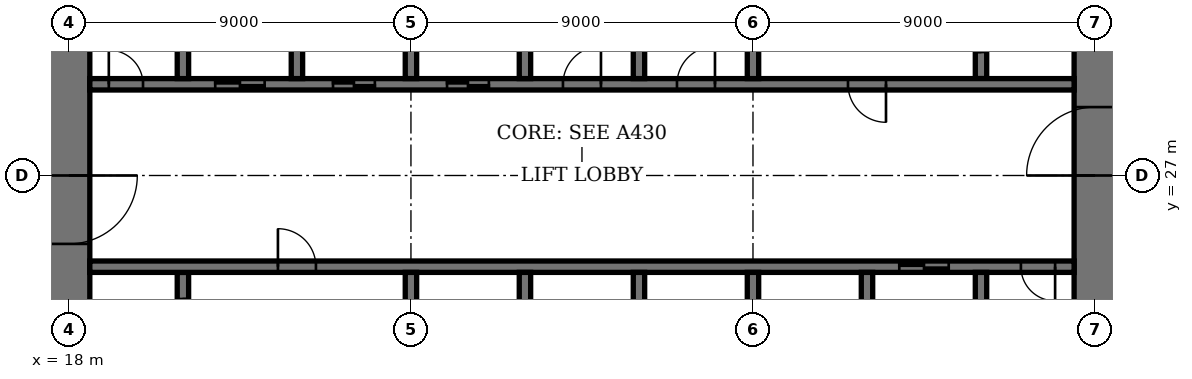
"""IFC4 building model, lengths in metres.
Left out: names, types, materials, properties, quantities, classifications, styles, units other than length and angle.
Written with IfcOpenShell. Run it as: python <this file> out.ifc"""

import sys

from ifc_helpers import new_model, si_unit, direction, frame, frame_2d, origin, place, context, subcontext, project, spatial, rectangle, extrude, element, fill, save


model = new_model("IFC4")
c1 = context("Model", 3, precision=1e-05, world=origin(), true_north=direction((0.0, 1.0)))
c2 = subcontext(c1, "Body", "Model", "MODEL_VIEW")
j1 = project(units=[si_unit("LENGTHUNIT", "METRE"), si_unit("PLANEANGLEUNIT", "RADIAN")], contexts=[c1])
p1 = place(None, origin())
s1 = spatial("IfcSite", under=j1, at=p1, CompositionType="ELEMENT")
p2 = place(p1, origin())
s2 = spatial("IfcBuilding", under=s1, at=p2, CompositionType="ELEMENT")
p3 = place(p2, frame((0.0, 0.0, 166.2)))
s3 = spatial("IfcBuildingStorey", under=s2, at=p3, CompositionType="ELEMENT", Elevation=166.2)
p4 = place(p3, frame((18.0, 35.45, 0.0), z_axis=(0.0, 0.0, 1.0), x_axis=(0.0, -1.0, 0.0)))
e1 = element("IfcWall", 1, at=p4, inside=s3, PredefinedType="SHEAR", context=c2, shape_type="SweptSolid", body=[
    extrude(rectangle(XDim=16.9, YDim=1.1, at=frame_2d((8.45, 0.0))), origin(), (0.0, 0.0, 1.0), 4.0),
])
p5 = place(p4, frame((8.45, 0.0, 0.0)))
e2 = element("IfcOpeningElement", 2, at=p5, cuts=e1, PredefinedType="OPENING", context=c2, shape_type="SweptSolid", body=[
    extrude(rectangle(XDim=1.8, YDim=2.4, at=frame_2d((0.9, 1.2))), frame((0.0, 0.56, 0.0), z_axis=(0.0, -1.0, 0.0), x_axis=(1.0, 0.0, 0.0)), (0.0, 0.0, 1.0), 1.12),
])
p6 = place(p3, frame((45.0, 18.55, 0.0), z_axis=(0.0, 0.0, 1.0), x_axis=(0.0, 1.0, 0.0)))
e3 = element("IfcWall", 3, at=p6, inside=s3, PredefinedType="SHEAR", context=c2, shape_type="SweptSolid", body=[
    extrude(rectangle(XDim=16.9, YDim=1.1, at=frame_2d((8.45, 0.0))), origin(), (0.0, 0.0, 1.0), 4.0),
])
p7 = place(p6, frame((8.45, 0.0, 0.0)))
e4 = element("IfcOpeningElement", 4, at=p7, cuts=e3, PredefinedType="OPENING", context=c2, shape_type="SweptSolid", body=[
    extrude(rectangle(XDim=1.8, YDim=2.4, at=frame_2d((0.9, 1.2))), frame((0.0, 0.56, 0.0), z_axis=(0.0, -1.0, 0.0), x_axis=(1.0, 0.0, 0.0)), (0.0, 0.0, 1.0), 1.12),
])
p8 = place(p3, frame((21.0, 21.95, 0.0), z_axis=(0.0, 0.0, 1.0), x_axis=(0.0, 1.0, 0.0)))
e5 = element("IfcWall", 5, at=p8, inside=s3, PredefinedType="SHEAR", context=c2, shape_type="SweptSolid", body=[
    extrude(rectangle(XDim=2.5, YDim=0.3, at=frame_2d((1.25, 0.0))), origin(), (0.0, 0.0, 1.0), 4.0),
])
p9 = place(p8, frame((0.7, 0.0, 0.0)))
e6 = element("IfcOpeningElement", 6, at=p9, cuts=e5, PredefinedType="OPENING", context=c2, shape_type="SweptSolid", body=[
    extrude(rectangle(XDim=1.1, YDim=2.4, at=frame_2d((0.55, 1.2))), frame((0.0, 0.16, 0.0), z_axis=(0.0, -1.0, 0.0), x_axis=(1.0, 0.0, 0.0)), (0.0, 0.0, 1.0), 0.32),
])
p10 = place(p3, frame((42.0, 29.55, 0.0), z_axis=(0.0, 0.0, 1.0), x_axis=(0.0, 1.0, 0.0)))
e7 = element("IfcWall", 7, at=p10, inside=s3, PredefinedType="SHEAR", context=c2, shape_type="SweptSolid", body=[
    extrude(rectangle(XDim=2.5, YDim=0.3, at=frame_2d((1.25, 0.0))), origin(), (0.0, 0.0, 1.0), 4.0),
])
p11 = place(p10, frame((0.7, 0.0, 0.0)))
e8 = element("IfcOpeningElement", 8, at=p11, cuts=e7, PredefinedType="OPENING", context=c2, shape_type="SweptSolid", body=[
    extrude(rectangle(XDim=1.1, YDim=2.4, at=frame_2d((0.55, 1.2))), frame((0.0, 0.16, 0.0), z_axis=(0.0, -1.0, 0.0), x_axis=(1.0, 0.0, 0.0)), (0.0, 0.0, 1.0), 0.32),
])
p12 = place(p3, frame((18.55, 24.6, 0.0), z_axis=(0.0, 0.0, 1.0), x_axis=(1.0, 0.0, 0.0)))
e9 = element("IfcWall", 9, at=p12, inside=s3, PredefinedType="SHEAR", context=c2, shape_type="SweptSolid", body=[
    extrude(rectangle(XDim=25.9, YDim=0.3, at=frame_2d((12.95, 0.0))), origin(), (0.0, 0.0, 1.0), 4.0),
])
p13 = place(p12, frame((4.95, 0.0, 0.0)))
e10 = element("IfcOpeningElement", 10, at=p13, cuts=e9, PredefinedType="OPENING", context=c2, shape_type="SweptSolid", body=[
    extrude(rectangle(XDim=1.0, YDim=2.4, at=frame_2d((0.5, 1.2))), frame((0.0, 0.16, 0.0), z_axis=(0.0, -1.0, 0.0), x_axis=(1.0, 0.0, 0.0)), (0.0, 0.0, 1.0), 0.32),
])
p14 = place(p12, frame((24.5, 0.0, 0.0)))
e11 = element("IfcOpeningElement", 11, at=p14, cuts=e9, PredefinedType="OPENING", context=c2, shape_type="SweptSolid", body=[
    extrude(rectangle(XDim=0.9, YDim=2.1, at=frame_2d((0.45, 1.05))), frame((0.0, 0.16, 0.0), z_axis=(0.0, -1.0, 0.0), x_axis=(1.0, 0.0, 0.0)), (0.0, 0.0, 1.0), 0.32),
])
p15 = place(p12, frame((21.3, 0.0, 0.0)))
e12 = element("IfcOpeningElement", 12, at=p15, cuts=e9, PredefinedType="OPENING", context=c2, shape_type="SweptSolid", body=[
    extrude(rectangle(XDim=1.3, YDim=2.4, at=frame_2d((0.65, 1.2))), frame((0.0, 0.16, 0.0), z_axis=(0.0, -1.0, 0.0), x_axis=(1.0, 0.0, 0.0)), (0.0, 0.0, 1.0), 0.32),
])
p16 = place(p3, frame((18.55, 29.4, 0.0), z_axis=(0.0, 0.0, 1.0), x_axis=(1.0, 0.0, 0.0)))
e13 = element("IfcWall", 13, at=p16, inside=s3, PredefinedType="SHEAR", context=c2, shape_type="SweptSolid", body=[
    extrude(rectangle(XDim=25.9, YDim=0.3, at=frame_2d((12.95, 0.0))), origin(), (0.0, 0.0, 1.0), 4.0),
])
p17 = place(p16, frame((19.95, 0.0, 0.0)))
e14 = element("IfcOpeningElement", 14, at=p17, cuts=e13, PredefinedType="OPENING", context=c2, shape_type="SweptSolid", body=[
    extrude(rectangle(XDim=1.0, YDim=2.4, at=frame_2d((0.5, 1.2))), frame((0.0, 0.16, 0.0), z_axis=(0.0, -1.0, 0.0), x_axis=(1.0, 0.0, 0.0)), (0.0, 0.0, 1.0), 0.32),
])
p18 = place(p16, frame((0.5, 0.0, 0.0)))
e15 = element("IfcOpeningElement", 15, at=p18, cuts=e13, PredefinedType="OPENING", context=c2, shape_type="SweptSolid", body=[
    extrude(rectangle(XDim=0.9, YDim=2.1, at=frame_2d((0.45, 1.05))), frame((0.0, 0.16, 0.0), z_axis=(0.0, -1.0, 0.0), x_axis=(1.0, 0.0, 0.0)), (0.0, 0.0, 1.0), 0.32),
])
p19 = place(p16, frame((15.45, 0.0, 0.0)))
e16 = element("IfcOpeningElement", 16, at=p19, cuts=e13, PredefinedType="OPENING", context=c2, shape_type="SweptSolid", body=[
    extrude(rectangle(XDim=1.0, YDim=2.4, at=frame_2d((0.5, 1.2))), frame((0.0, 0.16, 0.0), z_axis=(0.0, -1.0, 0.0), x_axis=(1.0, 0.0, 0.0)), (0.0, 0.0, 1.0), 0.32),
])
p20 = place(p16, frame((12.45, 0.0, 0.0)))
e17 = element("IfcOpeningElement", 17, at=p20, cuts=e13, PredefinedType="OPENING", context=c2, shape_type="SweptSolid", body=[
    extrude(rectangle(XDim=1.0, YDim=2.4, at=frame_2d((0.5, 1.2))), frame((0.0, 0.16, 0.0), z_axis=(0.0, -1.0, 0.0), x_axis=(1.0, 0.0, 0.0)), (0.0, 0.0, 1.0), 0.32),
])
p21 = place(p16, frame((9.4, 0.0, 0.0)))
e18 = element("IfcOpeningElement", 18, at=p21, cuts=e13, PredefinedType="OPENING", context=c2, shape_type="SweptSolid", body=[
    extrude(rectangle(XDim=1.1, YDim=2.4, at=frame_2d((0.55, 1.2))), frame((0.0, 0.16, 0.0), z_axis=(0.0, -1.0, 0.0), x_axis=(1.0, 0.0, 0.0)), (0.0, 0.0, 1.0), 0.32),
])
p22 = place(p16, frame((6.4, 0.0, 0.0)))
e19 = element("IfcOpeningElement", 19, at=p22, cuts=e13, PredefinedType="OPENING", context=c2, shape_type="SweptSolid", body=[
    extrude(rectangle(XDim=1.1, YDim=2.4, at=frame_2d((0.55, 1.2))), frame((0.0, 0.16, 0.0), z_axis=(0.0, -1.0, 0.0), x_axis=(1.0, 0.0, 0.0)), (0.0, 0.0, 1.0), 0.32),
])
p23 = place(p16, frame((3.3, 0.0, 0.0)))
e20 = element("IfcOpeningElement", 20, at=p23, cuts=e13, PredefinedType="OPENING", context=c2, shape_type="SweptSolid", body=[
    extrude(rectangle(XDim=1.3, YDim=2.4, at=frame_2d((0.65, 1.2))), frame((0.0, 0.16, 0.0), z_axis=(0.0, -1.0, 0.0), x_axis=(1.0, 0.0, 0.0)), (0.0, 0.0, 1.0), 0.32),
])
for number, where, z_axis, x_axis in (
    (21, (30.0, 21.75, 0.0), (0.0, 0.0, 1.0), (0.0, 1.0, 0.0)),
    (22, (33.0, 29.55, 0.0), (0.0, 0.0, 1.0), (0.0, 1.0, 0.0)),
    (23, (33.0, 21.75, 0.0), (0.0, 0.0, 1.0), (0.0, 1.0, 0.0)),
    (24, (30.0, 29.55, 0.0), (0.0, 0.0, 1.0), (0.0, 1.0, 0.0)),
    (25, (36.0, 21.75, 0.0), (0.0, 0.0, 1.0), (0.0, 1.0, 0.0)),
    (26, (27.0, 29.55, 0.0), (0.0, 0.0, 1.0), (0.0, 1.0, 0.0)),
):
    element("IfcWall", number, at=place(p3, frame(where, z_axis=z_axis, x_axis=x_axis)), inside=s3, PredefinedType="SHEAR", context=c2, shape_type="SweptSolid", body=[
        extrude(rectangle(XDim=2.7, YDim=0.3, at=frame_2d((1.35, 0.0))), origin(), (0.0, 0.0, 1.0), 4.0),
    ])
for number, where, z_axis, x_axis in (
    (27, (39.0, 18.55, 0.0), (0.0, 0.0, 1.0), (0.0, 1.0, 0.0)),
    (28, (24.0, 29.55, 0.0), (0.0, 0.0, 1.0), (0.0, 1.0, 0.0)),
):
    element("IfcWall", number, at=place(p3, frame(where, z_axis=z_axis, x_axis=x_axis)), inside=s3, PredefinedType="SHEAR", context=c2, shape_type="SweptSolid", body=[
        extrude(rectangle(XDim=5.9, YDim=0.3, at=frame_2d((2.95, 0.0))), origin(), (0.0, 0.0, 1.0), 4.0),
    ])
for number, where, z_axis, x_axis in (
    (29, (42.0, 21.75, 0.0), (0.0, 0.0, 1.0), (0.0, 1.0, 0.0)),
    (30, (21.0, 29.55, 0.0), (0.0, 0.0, 1.0), (0.0, 1.0, 0.0)),
):
    element("IfcWall", number, at=place(p3, frame(where, z_axis=z_axis, x_axis=x_axis)), inside=s3, PredefinedType="SHEAR", context=c2, shape_type="SweptSolid", body=[
        extrude(rectangle(XDim=2.7, YDim=0.3, at=frame_2d((1.35, 0.0))), origin(), (0.0, 0.0, 1.0), 4.0),
    ])
for number, where, z_axis, x_axis in (
    (31, (27.0, 21.6, 0.0), (0.0, 0.0, 1.0), (0.0, 1.0, 0.0)),
    (32, (36.0, 29.55, 0.0), (0.0, 0.0, 1.0), (0.0, 1.0, 0.0)),
):
    element("IfcWall", number, at=place(p3, frame(where, z_axis=z_axis, x_axis=x_axis)), inside=s3, PredefinedType="SHEAR", context=c2, shape_type="SweptSolid", body=[
        extrude(rectangle(XDim=2.85, YDim=0.3, at=frame_2d((1.425, 0.0))), origin(), (0.0, 0.0, 1.0), 4.0),
    ])
p24 = place(p5, origin())
e33 = element("IfcDoor", 33, at=p24, inside=s3, OperationType="DOUBLE_DOOR_DOUBLE_SWING", PredefinedType="DOOR", context=c2, shape_type="SweptSolid", body=[
    extrude(rectangle(XDim=1.8, YDim=2.4, at=frame_2d((0.9, 1.2))), frame((0.0, 0.03, 0.0), z_axis=(0.0, -1.0, 0.0), x_axis=(1.0, 0.0, 0.0)), (0.0, 0.0, 1.0), 0.06),
    extrude(rectangle(XDim=0.04, YDim=2.4, at=frame_2d((0.02, 1.2))), frame((0.0, 0.55, 0.0), z_axis=(0.0, -1.0, 0.0), x_axis=(1.0, 0.0, 0.0)), (0.0, 0.0, 1.0), 1.1),
    extrude(rectangle(XDim=0.04, YDim=2.4, at=frame_2d((1.78, 1.2))), frame((0.0, 0.55, 0.0), z_axis=(0.0, -1.0, 0.0), x_axis=(1.0, 0.0, 0.0)), (0.0, 0.0, 1.0), 1.1),
    extrude(rectangle(XDim=1.8, YDim=0.04, at=frame_2d((0.9, 2.38))), frame((0.0, 0.55, 0.0), z_axis=(0.0, -1.0, 0.0), x_axis=(1.0, 0.0, 0.0)), (0.0, 0.0, 1.0), 1.1),
])
fill(e2, e33)
p25 = place(p7, origin())
e34 = element("IfcDoor", 34, at=p25, inside=s3, OperationType="DOUBLE_DOOR_DOUBLE_SWING", PredefinedType="DOOR", context=c2, shape_type="SweptSolid", body=[
    extrude(rectangle(XDim=1.8, YDim=2.4, at=frame_2d((0.9, 1.2))), frame((0.0, 0.03, 0.0), z_axis=(0.0, -1.0, 0.0), x_axis=(1.0, 0.0, 0.0)), (0.0, 0.0, 1.0), 0.06),
    extrude(rectangle(XDim=0.04, YDim=2.4, at=frame_2d((0.02, 1.2))), frame((0.0, 0.55, 0.0), z_axis=(0.0, -1.0, 0.0), x_axis=(1.0, 0.0, 0.0)), (0.0, 0.0, 1.0), 1.1),
    extrude(rectangle(XDim=0.04, YDim=2.4, at=frame_2d((1.78, 1.2))), frame((0.0, 0.55, 0.0), z_axis=(0.0, -1.0, 0.0), x_axis=(1.0, 0.0, 0.0)), (0.0, 0.0, 1.0), 1.1),
    extrude(rectangle(XDim=1.8, YDim=0.04, at=frame_2d((0.9, 2.38))), frame((0.0, 0.55, 0.0), z_axis=(0.0, -1.0, 0.0), x_axis=(1.0, 0.0, 0.0)), (0.0, 0.0, 1.0), 1.1),
])
fill(e4, e34)
p26 = place(p13, origin())
e35 = element("IfcDoor", 35, at=p26, inside=s3, OperationType="SINGLE_SWING_RIGHT", PredefinedType="DOOR", context=c2, shape_type="SweptSolid", body=[
    extrude(rectangle(XDim=1.0, YDim=2.4, at=frame_2d((0.5, 1.2))), frame((0.0, 0.03, 0.0), z_axis=(0.0, -1.0, 0.0), x_axis=(1.0, 0.0, 0.0)), (0.0, 0.0, 1.0), 0.06),
])
fill(e10, e35)
p27 = place(p17, origin())
e36 = element("IfcDoor", 36, at=p27, inside=s3, OperationType="SINGLE_SWING_RIGHT", PredefinedType="DOOR", context=c2, shape_type="SweptSolid", body=[
    extrude(rectangle(XDim=1.0, YDim=2.4, at=frame_2d((0.5, 1.2))), frame((0.0, 0.03, 0.0), z_axis=(0.0, -1.0, 0.0), x_axis=(1.0, 0.0, 0.0)), (0.0, 0.0, 1.0), 0.06),
])
fill(e14, e36)
p28 = place(p14, origin())
e37 = element("IfcDoor", 37, at=p28, inside=s3, OperationType="SINGLE_SWING_RIGHT", PredefinedType="DOOR", context=c2, shape_type="SweptSolid", body=[
    extrude(rectangle(XDim=0.9, YDim=2.1, at=frame_2d((0.45, 1.05))), frame((0.0, 0.03, 0.0), z_axis=(0.0, -1.0, 0.0), x_axis=(1.0, 0.0, 0.0)), (0.0, 0.0, 1.0), 0.06),
])
fill(e11, e37)
p29 = place(p18, origin())
e38 = element("IfcDoor", 38, at=p29, inside=s3, OperationType="SINGLE_SWING_RIGHT", PredefinedType="DOOR", context=c2, shape_type="SweptSolid", body=[
    extrude(rectangle(XDim=0.9, YDim=2.1, at=frame_2d((0.45, 1.05))), frame((0.0, 0.03, 0.0), z_axis=(0.0, -1.0, 0.0), x_axis=(1.0, 0.0, 0.0)), (0.0, 0.0, 1.0), 0.06),
])
fill(e15, e38)
p30 = place(p19, origin())
e39 = element("IfcDoor", 39, at=p30, inside=s3, OperationType="SINGLE_SWING_LEFT", PredefinedType="DOOR", context=c2, shape_type="SweptSolid", body=[
    extrude(rectangle(XDim=1.0, YDim=2.4, at=frame_2d((0.5, 1.2))), frame((0.0, 0.03, 0.0), z_axis=(0.0, -1.0, 0.0), x_axis=(1.0, 0.0, 0.0)), (0.0, 0.0, 1.0), 0.06),
])
fill(e16, e39)
p31 = place(p20, origin())
e40 = element("IfcDoor", 40, at=p31, inside=s3, OperationType="SINGLE_SWING_LEFT", PredefinedType="DOOR", context=c2, shape_type="SweptSolid", body=[
    extrude(rectangle(XDim=1.0, YDim=2.4, at=frame_2d((0.5, 1.2))), frame((0.0, 0.03, 0.0), z_axis=(0.0, -1.0, 0.0), x_axis=(1.0, 0.0, 0.0)), (0.0, 0.0, 1.0), 0.06),
])
fill(e17, e40)
p32 = place(p21, origin())
e41 = element("IfcDoor", 41, at=p32, inside=s3, OperationType="DOUBLE_DOOR_SLIDING", PredefinedType="DOOR", context=c2, shape_type="SweptSolid", body=[
    extrude(rectangle(XDim=1.1, YDim=2.4, at=frame_2d((0.55, 1.2))), frame((0.0, 0.02, 0.0), z_axis=(0.0, -1.0, 0.0), x_axis=(1.0, 0.0, 0.0)), (0.0, 0.0, 1.0), 0.04),
])
fill(e18, e41)
p33 = place(p22, origin())
e42 = element("IfcDoor", 42, at=p33, inside=s3, OperationType="DOUBLE_DOOR_SLIDING", PredefinedType="DOOR", context=c2, shape_type="SweptSolid", body=[
    extrude(rectangle(XDim=1.1, YDim=2.4, at=frame_2d((0.55, 1.2))), frame((0.0, 0.02, 0.0), z_axis=(0.0, -1.0, 0.0), x_axis=(1.0, 0.0, 0.0)), (0.0, 0.0, 1.0), 0.04),
])
fill(e19, e42)
p34 = place(p15, origin())
e43 = element("IfcDoor", 43, at=p34, inside=s3, OperationType="DOUBLE_DOOR_SLIDING", PredefinedType="DOOR", context=c2, shape_type="SweptSolid", body=[
    extrude(rectangle(XDim=1.3, YDim=2.4, at=frame_2d((0.65, 1.2))), frame((0.0, 0.02, 0.0), z_axis=(0.0, -1.0, 0.0), x_axis=(1.0, 0.0, 0.0)), (0.0, 0.0, 1.0), 0.04),
])
fill(e12, e43)
p35 = place(p23, origin())
e44 = element("IfcDoor", 44, at=p35, inside=s3, OperationType="DOUBLE_DOOR_SLIDING", PredefinedType="DOOR", context=c2, shape_type="SweptSolid", body=[
    extrude(rectangle(XDim=1.3, YDim=2.4, at=frame_2d((0.65, 1.2))), frame((0.0, 0.02, 0.0), z_axis=(0.0, -1.0, 0.0), x_axis=(1.0, 0.0, 0.0)), (0.0, 0.0, 1.0), 0.04),
])
fill(e20, e44)
save(model, sys.argv[1])
